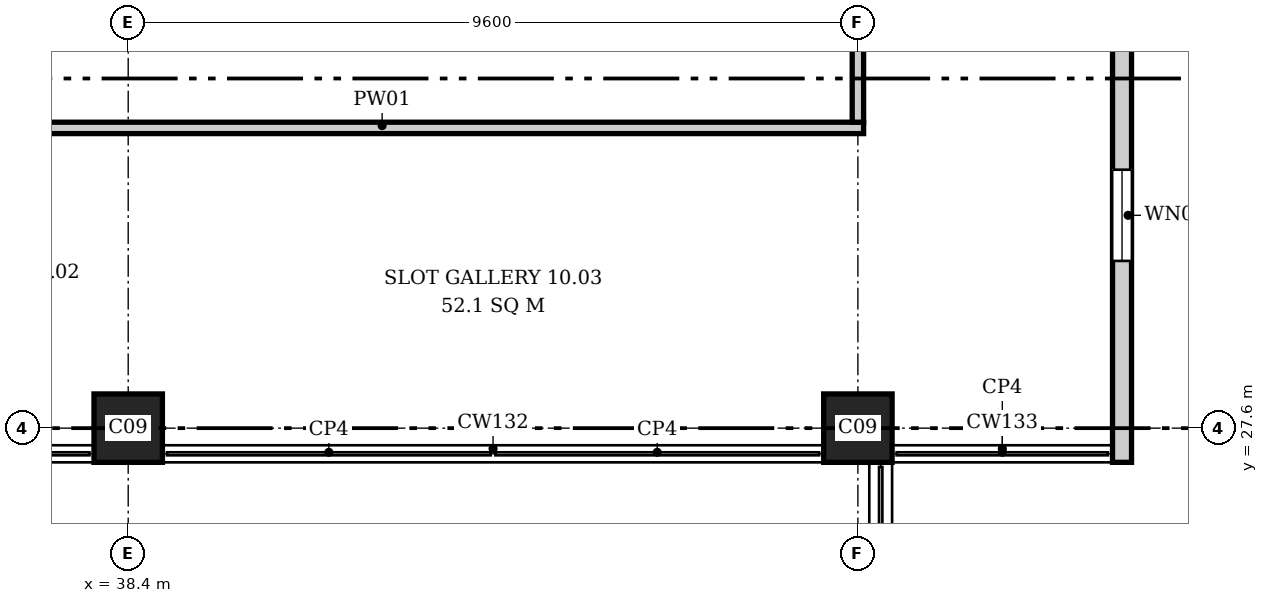
"""IFC4 building model, lengths in metres.
Left out: names, types, materials, properties, quantities, classifications, styles, units other than length and angle.
Written with IfcOpenShell. Run it as: python <this file> out.ifc"""

import sys

from ifc_helpers import new_model, si_unit, direction, frame, frame_2d, origin, origin_2d, place, context, subcontext, project, spatial, rectangle, extrude, element, fill, save


model = new_model("IFC4")
c1 = context("Model", 3, precision=1e-05, world=origin(), true_north=direction((0.0, 1.0)))
c2 = subcontext(c1, "Body", "Model", "MODEL_VIEW")
j1 = project(units=[si_unit("LENGTHUNIT", "METRE"), si_unit("PLANEANGLEUNIT", "RADIAN")], contexts=[c1])
p1 = place(None, origin())
s1 = spatial("IfcSite", under=j1, at=p1, CompositionType="ELEMENT")
p2 = place(p1, origin())
s2 = spatial("IfcBuilding", under=s1, at=p2, CompositionType="ELEMENT")
p3 = place(p2, frame((0.0, 0.0, 52.9)))
s3 = spatial("IfcBuildingStorey", under=s2, at=p3, CompositionType="ELEMENT", Elevation=52.9)
for number, where, z_axis, x_axis in (
    (1, (38.4, 27.6, 0.0), (0.0, 0.0, 1.0), (1.0, 0.0, 0.0)),
    (2, (48.0, 27.6, 0.0), (0.0, 0.0, 1.0), (1.0, 0.0, 0.0)),
):
    element("IfcColumn", number, at=place(p3, frame(where, z_axis=z_axis, x_axis=x_axis)), inside=s3, PredefinedType="COLUMN", context=c2, shape_type="SweptSolid", body=[
        extrude(rectangle(XDim=0.9, YDim=0.9, at=origin_2d()), origin(), (0.0, 0.0, 1.0), 4.2),
    ])
p4 = place(p3, frame((51.475, 27.15, 0.0), z_axis=(0.0, 0.0, 1.0), x_axis=(0.0, 1.0, 0.0)))
e3 = element("IfcWall", 3, at=p4, inside=s3, PredefinedType="ELEMENTEDWALL", context=c2, shape_type="SweptSolid", body=[
    extrude(rectangle(XDim=19.3, YDim=0.25, at=frame_2d((9.65, 0.0))), origin(), (0.0, 0.0, 1.0), 3.2),
])
p5 = place(p4, frame((2.65, 0.0, 0.6)))
e4 = element("IfcOpeningElement", 4, at=p5, cuts=e3, PredefinedType="OPENING", context=c2, shape_type="SweptSolid", body=[
    extrude(rectangle(XDim=1.2, YDim=2.5, at=frame_2d((0.6, 1.25))), frame((0.0, 0.135, 0.0), z_axis=(0.0, -1.0, 0.0), x_axis=(1.0, 0.0, 0.0)), (0.0, 0.0, 1.0), 0.27),
])
p6 = place(p4, frame((6.25, 0.0, 0.6)))
e5 = element("IfcOpeningElement", 5, at=p6, cuts=e3, PredefinedType="OPENING", context=c2, shape_type="SweptSolid", body=[
    extrude(rectangle(XDim=1.2, YDim=2.5, at=frame_2d((0.6, 1.25))), frame((0.0, 0.135, 0.0), z_axis=(0.0, -1.0, 0.0), x_axis=(1.0, 0.0, 0.0)), (0.0, 0.0, 1.0), 0.27),
])
p7 = place(p4, frame((11.85, 0.0, 0.6)))
e6 = element("IfcOpeningElement", 6, at=p7, cuts=e3, PredefinedType="OPENING", context=c2, shape_type="SweptSolid", body=[
    extrude(rectangle(XDim=1.2, YDim=2.5, at=frame_2d((0.6, 1.25))), frame((0.0, 0.135, 0.0), z_axis=(0.0, -1.0, 0.0), x_axis=(1.0, 0.0, 0.0)), (0.0, 0.0, 1.0), 0.27),
])
p8 = place(p4, frame((15.45, 0.0, 0.6)))
e7 = element("IfcOpeningElement", 7, at=p8, cuts=e3, PredefinedType="OPENING", context=c2, shape_type="SweptSolid", body=[
    extrude(rectangle(XDim=1.2, YDim=2.5, at=frame_2d((0.6, 1.25))), frame((0.0, 0.135, 0.0), z_axis=(0.0, -1.0, 0.0), x_axis=(1.0, 0.0, 0.0)), (0.0, 0.0, 1.0), 0.27),
])
p9 = place(p3, frame((35.406, 31.55, 0.0), z_axis=(0.0, 0.0, 1.0), x_axis=(1.0, 0.0, 0.0)))
e8 = element("IfcWall", 8, at=p9, inside=s3, PredefinedType="PARTITIONING", context=c2, shape_type="SweptSolid", body=[
    extrude(rectangle(XDim=12.669, YDim=0.15, at=frame_2d((6.334, 0.0))), origin(), (0.0, 0.0, 1.0), 3.9),
])
p10 = place(p3, frame((48.0, 31.625, 0.0), z_axis=(0.0, 0.0, 1.0), x_axis=(0.0, 1.0, 0.0)))
e9 = element("IfcWall", 9, at=p10, inside=s3, PredefinedType="PARTITIONING", context=c2, shape_type="SweptSolid", body=[
    extrude(rectangle(XDim=3.1, YDim=0.15, at=frame_2d((1.55, 0.0))), origin(), (0.0, 0.0, 1.0), 3.3),
])
p11 = place(p5, origin())
e10 = element("IfcWindow", 10, at=p11, inside=s3, PartitioningType="SINGLE_PANEL", PredefinedType="WINDOW", context=c2, shape_type="SweptSolid", body=[
    extrude(rectangle(XDim=1.2, YDim=2.5, at=frame_2d((0.6, 1.25))), frame((0.0, 0.03, 0.0), z_axis=(0.0, -1.0, 0.0), x_axis=(1.0, 0.0, 0.0)), (0.0, 0.0, 1.0), 0.06),
])
fill(e4, e10)
save(model, sys.argv[1])
